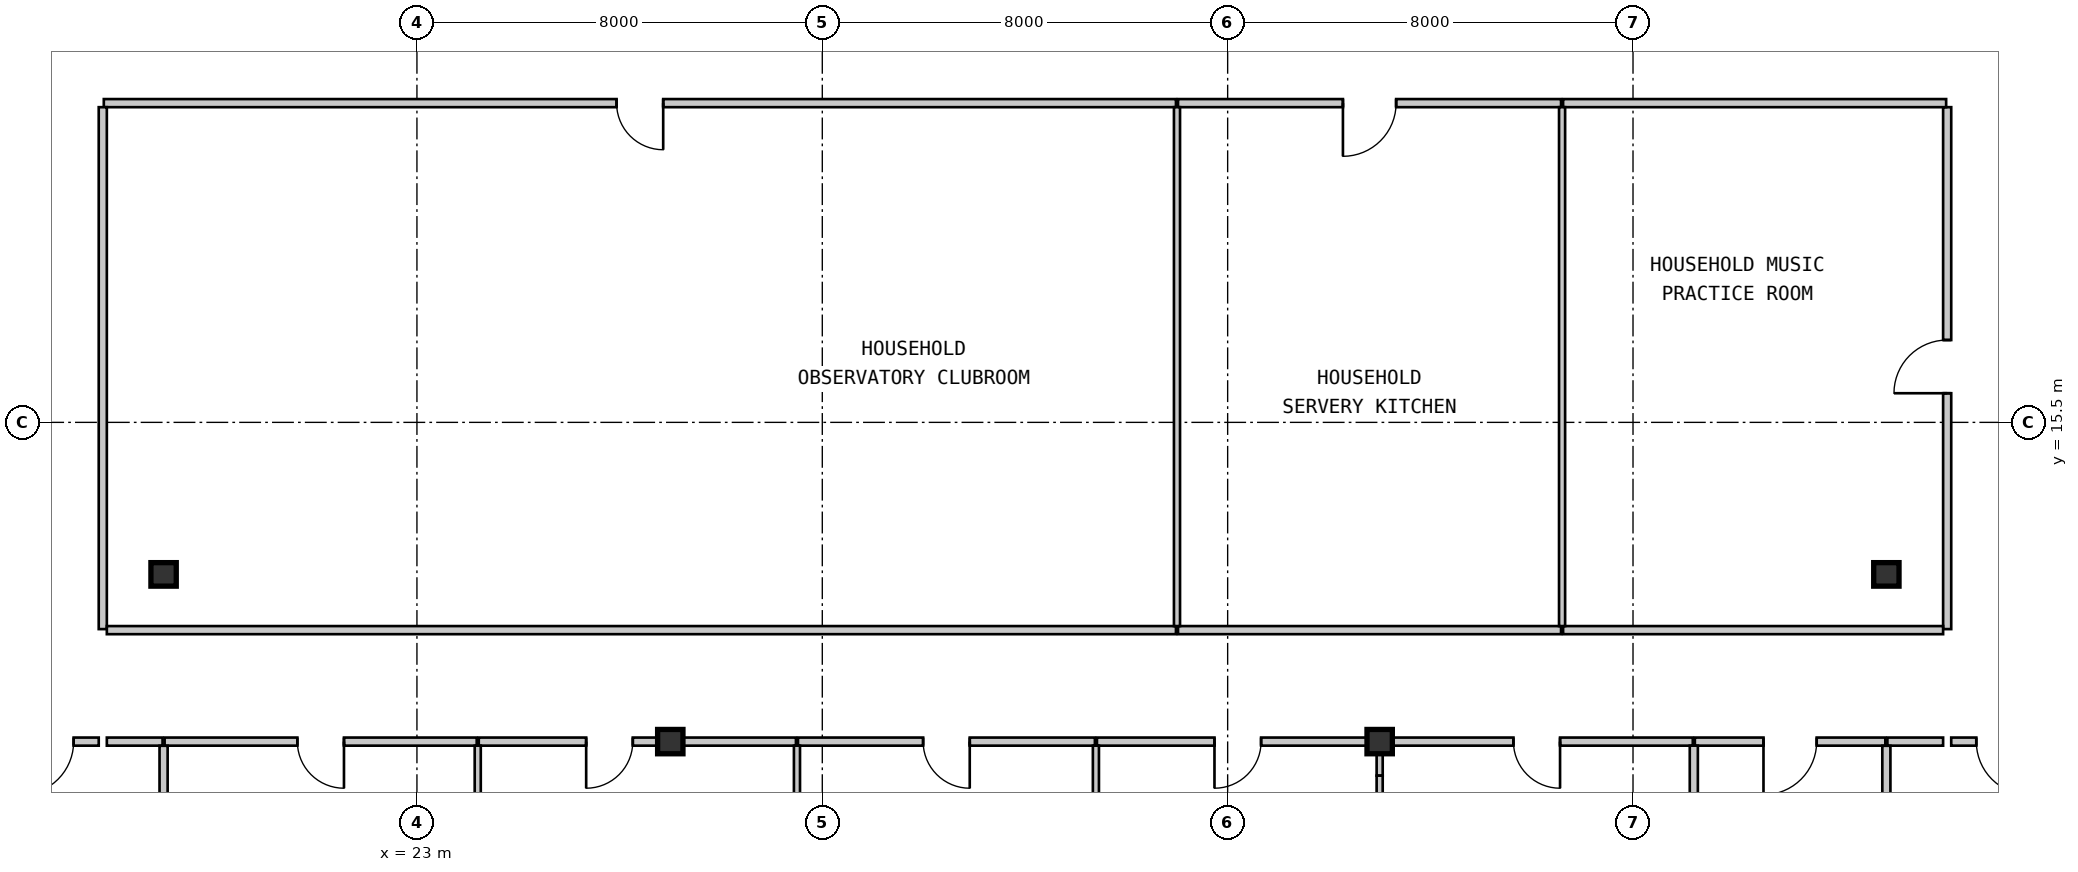
"""IFC4 building model, lengths in metres.
Left out: names, types, materials, properties, quantities, classifications, styles, units other than length and angle.
Written with IfcOpenShell. Run it as: python <this file> out.ifc"""

import sys

from ifc_helpers import new_model, si_unit, direction, frame, frame_2d, origin, origin_2d, place, context, subcontext, project, spatial, rectangle, i_section, extrude, source, transform, mapped, element, fill, save


model = new_model("IFC4")
c1 = context("Model", 3, precision=1e-05, world=origin(), true_north=direction((0.0, 1.0)))
c2 = subcontext(c1, "Body", "Model", "MODEL_VIEW")
j1 = project(units=[si_unit("LENGTHUNIT", "METRE"), si_unit("PLANEANGLEUNIT", "RADIAN")], contexts=[c1])
p1 = place(None, origin())
s1 = spatial("IfcSite", under=j1, at=p1, CompositionType="ELEMENT")
p2 = place(p1, origin())
s2 = spatial("IfcBuilding", under=s1, at=p2, CompositionType="ELEMENT")
p3 = place(p2, frame((0.0, 0.0, 51.45)))
s3 = spatial("IfcBuildingStorey", under=s2, at=p3, CompositionType="ELEMENT", Elevation=51.45)
m1 = source(origin(), c2, "Body", "SweptSolid", [
    extrude(i_section(OverallWidth=0.5, OverallDepth=0.48, WebThickness=0.028, FlangeThickness=0.044, at=origin_2d()), origin(), (0.0, 0.0, 1.0), 3.15),
])
for number, where, z_axis, x_axis in (
    (1, (28.0, 9.2, 0.0), (0.0, 0.0, 1.0), (1.0, 0.0, 0.0)),
    (2, (42.0, 9.2, 0.0), (0.0, 0.0, 1.0), (1.0, 0.0, 0.0)),
):
    element("IfcColumn", number, at=place(p3, frame(where, z_axis=z_axis, x_axis=x_axis)), inside=s3, PredefinedType="COLUMN", context=c2, shape_type="MappedRepresentation", body=[
        mapped(m1, transform((0.0, 0.0, 0.0), scale=1.0)),
    ])
m2 = source(origin(), c2, "Body", "SweptSolid", [
    extrude(i_section(OverallWidth=0.5, OverallDepth=0.464, WebThickness=0.022, FlangeThickness=0.034, at=origin_2d()), origin(), (0.0, 0.0, 1.0), 3.15),
])
for number, where, z_axis, x_axis in (
    (3, (18.0, 12.5, 0.0), (0.0, 0.0, 1.0), (1.0, 0.0, 0.0)),
    (4, (52.0, 12.5, 0.0), (0.0, 0.0, 1.0), (1.0, 0.0, 0.0)),
):
    element("IfcColumn", number, at=place(p3, frame(where, z_axis=z_axis, x_axis=x_axis)), inside=s3, PredefinedType="COLUMN", context=c2, shape_type="MappedRepresentation", body=[
        mapped(m2, transform((0.0, 0.0, 0.0), scale=1.0)),
    ])
m3 = source(origin(), c2, "Body", "SweptSolid", [
    extrude(rectangle(XDim=21.159, YDim=0.16, at=frame_2d((10.58, 0.0))), origin(), (0.0, 0.0, 1.0), 2.93),
])
p4 = place(p3, frame((37.98, 21.8, 0.0), z_axis=(0.0, 0.0, 1.0), x_axis=(-1.0, 0.0, 0.0)))
e5 = element("IfcWall", 5, at=p4, inside=s3, PredefinedType="PARTITIONING", context=c2, shape_type="MappedRepresentation", body=[
    mapped(m3, transform((0.0, 0.0, 0.0), scale=1.0)),
])
m4 = source(origin(), c2, "Body", "SweptSolid", [
    extrude(rectangle(XDim=0.92, YDim=2.1, at=frame_2d((0.46, 1.05))), frame((0.0, 0.09, 0.0), z_axis=(0.0, -1.0, 0.0), x_axis=(1.0, 0.0, 0.0)), (0.0, 0.0, 1.0), 0.18),
])
p5 = place(p4, frame((10.12, 0.0, 0.0)))
e6 = element("IfcOpeningElement", 6, at=p5, cuts=e5, PredefinedType="OPENING", context=c2, shape_type="MappedRepresentation", body=[
    mapped(m4, transform((0.0, 0.0, 0.0), scale=1.0)),
])
m5 = source(origin(), c2, "Body", "SweptSolid", [
    extrude(rectangle(XDim=10.3, YDim=0.16, at=frame_2d((5.15, 0.0))), origin(), (0.0, 0.0, 1.0), 2.93),
])
p6 = place(p3, frame((16.8, 21.72, 0.0), z_axis=(0.0, 0.0, 1.0), x_axis=(0.0, -1.0, 0.0)))
e7 = element("IfcWall", 7, at=p6, inside=s3, PredefinedType="PARTITIONING", context=c2, shape_type="MappedRepresentation", body=[
    mapped(m5, transform((0.0, 0.0, 0.0), scale=1.0)),
])
m6 = source(origin(), c2, "Body", "SweptSolid", [
    extrude(rectangle(XDim=7.56, YDim=0.16, at=frame_2d((3.78, 0.0))), origin(), (0.0, 0.0, 1.0), 2.93),
])
p7 = place(p3, frame((45.58, 21.8, 0.0), z_axis=(0.0, 0.0, 1.0), x_axis=(-1.0, 0.0, 0.0)))
e8 = element("IfcWall", 8, at=p7, inside=s3, PredefinedType="PARTITIONING", context=c2, shape_type="MappedRepresentation", body=[
    mapped(m6, transform((0.0, 0.0, 0.0), scale=1.0)),
])
m7 = source(origin(), c2, "Body", "SweptSolid", [
    extrude(rectangle(XDim=1.05, YDim=2.1, at=frame_2d((0.525, 1.05))), frame((0.0, 0.09, 0.0), z_axis=(0.0, -1.0, 0.0), x_axis=(1.0, 0.0, 0.0)), (0.0, 0.0, 1.0), 0.18),
])
p8 = place(p7, frame((3.255, 0.0, 0.0)))
e9 = element("IfcOpeningElement", 9, at=p8, cuts=e8, PredefinedType="OPENING", context=c2, shape_type="MappedRepresentation", body=[
    mapped(m7, transform((0.0, 0.0, 0.0), scale=1.0)),
])
p9 = place(p3, frame((53.2, 11.42, 0.0), z_axis=(0.0, 0.0, 1.0), x_axis=(0.0, 1.0, 0.0)))
e10 = element("IfcWall", 10, at=p9, inside=s3, PredefinedType="PARTITIONING", context=c2, shape_type="MappedRepresentation", body=[
    mapped(m5, transform((0.0, 0.0, 0.0), scale=1.0)),
])
p10 = place(p9, frame((4.655, 0.0, 0.0)))
e11 = element("IfcOpeningElement", 11, at=p10, cuts=e10, PredefinedType="OPENING", context=c2, shape_type="MappedRepresentation", body=[
    mapped(m7, transform((0.0, 0.0, 0.0), scale=1.0)),
])
p11 = place(p3, frame((53.18, 21.8, 0.0), z_axis=(0.0, 0.0, 1.0), x_axis=(-1.0, 0.0, 0.0)))
e12 = element("IfcWall", 12, at=p11, inside=s3, PredefinedType="PARTITIONING", context=c2, shape_type="MappedRepresentation", body=[
    mapped(m6, transform((0.0, 0.0, 0.0), scale=1.0)),
])
m8 = source(origin(), c2, "Body", "SweptSolid", [
    extrude(rectangle(XDim=2.04, YDim=0.16, at=frame_2d((1.02, 0.0))), origin(), (0.0, 0.0, 1.0), 2.93),
])
p12 = place(p3, frame((16.72, 9.2, 0.0), z_axis=(0.0, 0.0, 1.0), x_axis=(-1.0, 0.0, 0.0)))
e13 = element("IfcWall", 13, at=p12, inside=s3, PredefinedType="PARTITIONING", context=c2, shape_type="MappedRepresentation", body=[
    mapped(m8, transform((0.0, 0.0, 0.0), scale=1.0)),
])
p13 = place(p12, frame((0.495, 0.0, 0.0)))
e14 = element("IfcOpeningElement", 14, at=p13, cuts=e13, PredefinedType="OPENING", context=c2, shape_type="MappedRepresentation", body=[
    mapped(m7, transform((0.0, 0.0, 0.0), scale=1.0)),
])
p14 = place(p3, frame((55.32, 9.2, 0.0), z_axis=(0.0, 0.0, 1.0), x_axis=(-1.0, 0.0, 0.0)))
e15 = element("IfcWall", 15, at=p14, inside=s3, PredefinedType="PARTITIONING", context=c2, shape_type="MappedRepresentation", body=[
    mapped(m8, transform((0.0, 0.0, 0.0), scale=1.0)),
])
p15 = place(p14, frame((0.495, 0.0, 0.0)))
e16 = element("IfcOpeningElement", 16, at=p15, cuts=e15, PredefinedType="OPENING", context=c2, shape_type="MappedRepresentation", body=[
    mapped(m7, transform((0.0, 0.0, 0.0), scale=1.0)),
])
m9 = source(origin(), c2, "Body", "SweptSolid", [
    extrude(rectangle(XDim=21.1, YDim=0.16, at=frame_2d((10.55, 0.0))), origin(), (0.0, 0.0, 1.0), 2.93),
])
p16 = place(p3, frame((16.88, 11.4, 0.0), z_axis=(0.0, 0.0, 1.0), x_axis=(1.0, 0.0, 0.0)))
e17 = element("IfcWall", 17, at=p16, inside=s3, PredefinedType="PARTITIONING", context=c2, shape_type="MappedRepresentation", body=[
    mapped(m9, transform((0.0, 0.0, 0.0), scale=1.0)),
])
p17 = place(p3, frame((38.02, 11.4, 0.0), z_axis=(0.0, 0.0, 1.0), x_axis=(1.0, 0.0, 0.0)))
e18 = element("IfcWall", 18, at=p17, inside=s3, PredefinedType="PARTITIONING", context=c2, shape_type="MappedRepresentation", body=[
    mapped(m6, transform((0.0, 0.0, 0.0), scale=1.0)),
])
m10 = source(origin(), c2, "Body", "SweptSolid", [
    extrude(rectangle(XDim=7.5, YDim=0.16, at=frame_2d((3.75, 0.0))), origin(), (0.0, 0.0, 1.0), 2.93),
])
p18 = place(p3, frame((45.62, 11.4, 0.0), z_axis=(0.0, 0.0, 1.0), x_axis=(1.0, 0.0, 0.0)))
e19 = element("IfcWall", 19, at=p18, inside=s3, PredefinedType="PARTITIONING", context=c2, shape_type="MappedRepresentation", body=[
    mapped(m10, transform((0.0, 0.0, 0.0), scale=1.0)),
])
m11 = source(origin(), c2, "Body", "SweptSolid", [
    extrude(rectangle(XDim=1.1, YDim=0.16, at=frame_2d((0.55, 0.0))), origin(), (0.0, 0.0, 1.0), 2.93),
])
p19 = place(p3, frame((17.98, 9.2, 0.0), z_axis=(0.0, 0.0, 1.0), x_axis=(-1.0, 0.0, 0.0)))
e20 = element("IfcWall", 20, at=p19, inside=s3, PredefinedType="PARTITIONING", context=c2, shape_type="MappedRepresentation", body=[
    mapped(m11, transform((0.0, 0.0, 0.0), scale=1.0)),
])
m12 = source(origin(), c2, "Body", "SweptSolid", [
    extrude(rectangle(XDim=6.159, YDim=0.16, at=frame_2d((3.08, 0.0))), origin(), (0.0, 0.0, 1.0), 2.93),
])
p20 = place(p3, frame((24.18, 9.2, 0.0), z_axis=(0.0, 0.0, 1.0), x_axis=(-1.0, 0.0, 0.0)))
e21 = element("IfcWall", 21, at=p20, inside=s3, PredefinedType="PARTITIONING", context=c2, shape_type="MappedRepresentation", body=[
    mapped(m12, transform((0.0, 0.0, 0.0), scale=1.0)),
])
p21 = place(p20, frame((2.62, 0.0, 0.0)))
e22 = element("IfcOpeningElement", 22, at=p21, cuts=e21, PredefinedType="OPENING", context=c2, shape_type="MappedRepresentation", body=[
    mapped(m4, transform((0.0, 0.0, 0.0), scale=1.0)),
])
m13 = source(origin(), c2, "Body", "SweptSolid", [
    extrude(rectangle(XDim=2.48, YDim=0.16, at=frame_2d((1.24, 0.0))), origin(), (0.0, 0.0, 1.0), 2.328),
])
p22 = place(p3, frame((30.48, 9.2, 0.0), z_axis=(0.0, 0.0, 1.0), x_axis=(-1.0, 0.0, 0.0)))
e23 = element("IfcWall", 23, at=p22, inside=s3, PredefinedType="PARTITIONING", context=c2, shape_type="MappedRepresentation", body=[
    mapped(m13, transform((0.0, 0.0, 0.0), scale=1.0)),
])
m14 = source(origin(), c2, "Body", "SweptSolid", [
    extrude(rectangle(XDim=3.78, YDim=0.16, at=frame_2d((1.89, 0.0))), origin(), (0.0, 0.0, 1.0), 2.93),
])
p23 = place(p3, frame((28.0, 9.2, 0.0), z_axis=(0.0, 0.0, 1.0), x_axis=(-1.0, 0.0, 0.0)))
e24 = element("IfcWall", 24, at=p23, inside=s3, PredefinedType="PARTITIONING", context=c2, shape_type="MappedRepresentation", body=[
    mapped(m14, transform((0.0, 0.0, 0.0), scale=1.0)),
])
p24 = place(p23, frame((0.74, 0.0, 0.0)))
e25 = element("IfcOpeningElement", 25, at=p24, cuts=e24, PredefinedType="OPENING", context=c2, shape_type="MappedRepresentation", body=[
    mapped(m4, transform((0.0, 0.0, 0.0), scale=1.0)),
])
m15 = source(origin(), c2, "Body", "SweptSolid", [
    extrude(rectangle(XDim=5.86, YDim=0.16, at=frame_2d((2.93, 0.0))), origin(), (0.0, 0.0, 1.0), 2.328),
])
p25 = place(p3, frame((36.38, 9.2, 0.0), z_axis=(0.0, 0.0, 1.0), x_axis=(-1.0, 0.0, 0.0)))
e26 = element("IfcWall", 26, at=p25, inside=s3, PredefinedType="PARTITIONING", context=c2, shape_type="MappedRepresentation", body=[
    mapped(m15, transform((0.0, 0.0, 0.0), scale=1.0)),
])
p26 = place(p25, frame((2.47, 0.0, 0.0)))
e27 = element("IfcOpeningElement", 27, at=p26, cuts=e26, PredefinedType="OPENING", context=c2, shape_type="MappedRepresentation", body=[
    mapped(m4, transform((0.0, 0.0, 0.0), scale=1.0)),
])
m16 = source(origin(), c2, "Body", "SweptSolid", [
    extrude(rectangle(XDim=5.56, YDim=0.16, at=frame_2d((2.78, 0.0))), origin(), (0.0, 0.0, 1.0), 2.328),
])
p27 = place(p3, frame((41.98, 9.2, 0.0), z_axis=(0.0, 0.0, 1.0), x_axis=(-1.0, 0.0, 0.0)))
e28 = element("IfcWall", 28, at=p27, inside=s3, PredefinedType="PARTITIONING", context=c2, shape_type="MappedRepresentation", body=[
    mapped(m16, transform((0.0, 0.0, 0.0), scale=1.0)),
])
p28 = place(p27, frame((2.32, 0.0, 0.0)))
e29 = element("IfcOpeningElement", 29, at=p28, cuts=e28, PredefinedType="OPENING", context=c2, shape_type="MappedRepresentation", body=[
    mapped(m4, transform((0.0, 0.0, 0.0), scale=1.0)),
])
p29 = place(p3, frame((48.18, 9.2, 0.0), z_axis=(0.0, 0.0, 1.0), x_axis=(-1.0, 0.0, 0.0)))
e30 = element("IfcWall", 30, at=p29, inside=s3, PredefinedType="PARTITIONING", context=c2, shape_type="MappedRepresentation", body=[
    mapped(m12, transform((0.0, 0.0, 0.0), scale=1.0)),
])
p30 = place(p29, frame((2.62, 0.0, 0.0)))
e31 = element("IfcOpeningElement", 31, at=p30, cuts=e30, PredefinedType="OPENING", context=c2, shape_type="MappedRepresentation", body=[
    mapped(m4, transform((0.0, 0.0, 0.0), scale=1.0)),
])
m17 = source(origin(), c2, "Body", "SweptSolid", [
    extrude(rectangle(XDim=3.76, YDim=0.16, at=frame_2d((1.88, 0.0))), origin(), (0.0, 0.0, 1.0), 2.93),
])
p31 = place(p3, frame((51.98, 9.2, 0.0), z_axis=(0.0, 0.0, 1.0), x_axis=(-1.0, 0.0, 0.0)))
e32 = element("IfcWall", 32, at=p31, inside=s3, PredefinedType="PARTITIONING", context=c2, shape_type="MappedRepresentation", body=[
    mapped(m17, transform((0.0, 0.0, 0.0), scale=1.0)),
])
p32 = place(p31, frame((1.355, 0.0, 0.0)))
e33 = element("IfcOpeningElement", 33, at=p32, cuts=e32, PredefinedType="OPENING", context=c2, shape_type="MappedRepresentation", body=[
    mapped(m7, transform((0.0, 0.0, 0.0), scale=1.0)),
])
p33 = place(p3, frame((53.12, 9.2, 0.0), z_axis=(0.0, 0.0, 1.0), x_axis=(-1.0, 0.0, 0.0)))
e34 = element("IfcWall", 34, at=p33, inside=s3, PredefinedType="PARTITIONING", context=c2, shape_type="MappedRepresentation", body=[
    mapped(m11, transform((0.0, 0.0, 0.0), scale=1.0)),
])
m18 = source(origin(), c2, "Body", "SweptSolid", [
    extrude(rectangle(XDim=10.24, YDim=0.12, at=frame_2d((5.12, 0.0))), origin(), (0.0, 0.0, 1.0), 2.93),
])
for number, where, z_axis, x_axis in (
    (35, (38.0, 21.72, 0.0), (0.0, 0.0, 1.0), (0.0, -1.0, 0.0)),
    (36, (45.6, 21.72, 0.0), (0.0, 0.0, 1.0), (0.0, -1.0, 0.0)),
):
    element("IfcWall", number, at=place(p3, frame(where, z_axis=z_axis, x_axis=x_axis)), inside=s3, PredefinedType="PARTITIONING", context=c2, shape_type="MappedRepresentation", body=[
        mapped(m18, transform((0.0, 0.0, 0.0), scale=1.0)),
    ])
m19 = source(origin(), c2, "Body", "SweptSolid", [
    extrude(rectangle(XDim=7.386, YDim=0.16, at=frame_2d((3.693, 0.0))), origin(), (0.0, 0.0, 1.0), 2.93),
])
p34 = place(p3, frame((18.0, 9.118, 0.0), z_axis=(0.0, 0.0, 1.0), x_axis=(0.0, -1.0, 0.0)))
e37 = element("IfcWall", 37, at=p34, inside=s3, PredefinedType="PARTITIONING", context=c2, shape_type="MappedRepresentation", body=[
    mapped(m19, transform((0.0, 0.0, 0.0), scale=1.0)),
])
m20 = source(origin(), c2, "Body", "SweptSolid", [
    extrude(rectangle(XDim=7.39, YDim=0.12, at=frame_2d((3.695, 0.0))), origin(), (0.0, 0.0, 1.0), 2.93),
])
for number, where, z_axis, x_axis in (
    (38, (24.2, 9.12, 0.0), (0.0, 0.0, 1.0), (0.0, -1.0, 0.0)),
    (39, (30.5, 9.12, 0.0), (0.0, 0.0, 1.0), (0.0, -1.0, 0.0)),
    (40, (36.4, 9.12, 0.0), (0.0, 0.0, 1.0), (0.0, -1.0, 0.0)),
):
    element("IfcWall", number, at=place(p3, frame(where, z_axis=z_axis, x_axis=x_axis)), inside=s3, PredefinedType="PARTITIONING", context=c2, shape_type="MappedRepresentation", body=[
        mapped(m20, transform((0.0, 0.0, 0.0), scale=1.0)),
    ])
m21 = source(origin(), c2, "Body", "SweptSolid", [
    extrude(rectangle(XDim=0.592, YDim=0.12, at=frame_2d((0.296, 0.0))), origin(), (0.0, 0.0, 1.0), 2.397),
])
p35 = place(p3, frame((42.0, 9.12, 0.0), z_axis=(0.0, 0.0, 1.0), x_axis=(0.0, -1.0, 0.0)))
e41 = element("IfcWall", 41, at=p35, inside=s3, PredefinedType="PARTITIONING", context=c2, shape_type="MappedRepresentation", body=[
    mapped(m21, transform((0.0, 0.0, 0.0), scale=1.0)),
])
m22 = source(origin(), c2, "Body", "SweptSolid", [
    extrude(rectangle(XDim=6.798, YDim=0.12, at=frame_2d((3.399, 0.0))), origin(), (0.0, 0.0, 1.0), 2.93),
])
p36 = place(p3, frame((42.0, 8.528, 0.0), z_axis=(0.0, 0.0, 1.0), x_axis=(0.0, -1.0, 0.0)))
e42 = element("IfcWall", 42, at=p36, inside=s3, PredefinedType="PARTITIONING", context=c2, shape_type="MappedRepresentation", body=[
    mapped(m22, transform((0.0, 0.0, 0.0), scale=1.0)),
])
m23 = source(origin(), c2, "Body", "SweptSolid", [
    extrude(rectangle(XDim=2.45, YDim=0.16, at=frame_2d((1.225, 0.0))), origin(), (0.0, 0.0, 1.0), 2.93),
])
p37 = place(p3, frame((48.2, 9.12, 0.0), z_axis=(0.0, 0.0, 1.0), x_axis=(0.0, -1.0, 0.0)))
e43 = element("IfcWall", 43, at=p37, inside=s3, PredefinedType="PARTITIONING", context=c2, shape_type="MappedRepresentation", body=[
    mapped(m23, transform((0.0, 0.0, 0.0), scale=1.0)),
])
m24 = source(origin(), c2, "Body", "SweptSolid", [
    extrude(rectangle(XDim=2.448, YDim=0.16, at=frame_2d((1.224, 0.0))), origin(), (0.0, 0.0, 1.0), 2.93),
])
p38 = place(p3, frame((52.0, 9.118, 0.0), z_axis=(0.0, 0.0, 1.0), x_axis=(0.0, -1.0, 0.0)))
e44 = element("IfcWall", 44, at=p38, inside=s3, PredefinedType="PARTITIONING", context=c2, shape_type="MappedRepresentation", body=[
    mapped(m24, transform((0.0, 0.0, 0.0), scale=1.0)),
])
m25 = source(origin(), c2, "Body", "SweptSolid", [
    extrude(rectangle(XDim=0.92, YDim=2.1, at=frame_2d((0.46, 1.05))), frame((0.0, 0.025, 0.0), z_axis=(0.0, -1.0, 0.0), x_axis=(1.0, 0.0, 0.0)), (0.0, 0.0, 1.0), 0.05),
])
p39 = place(p5, origin())
e45 = element("IfcDoor", 45, at=p39, inside=s3, OperationType="SINGLE_SWING_LEFT", PredefinedType="DOOR", context=c2, shape_type="MappedRepresentation", body=[
    mapped(m25, transform((0.0, 0.0, 0.0), scale=1.0)),
])
fill(e6, e45)
m26 = source(origin(), c2, "Body", "SweptSolid", [
    extrude(rectangle(XDim=1.05, YDim=2.1, at=frame_2d((0.525, 1.05))), frame((0.0, 0.025, 0.0), z_axis=(0.0, -1.0, 0.0), x_axis=(1.0, 0.0, 0.0)), (0.0, 0.0, 1.0), 0.05),
])
p40 = place(p8, origin())
e46 = element("IfcDoor", 46, at=p40, inside=s3, OperationType="SINGLE_SWING_RIGHT", PredefinedType="DOOR", context=c2, shape_type="MappedRepresentation", body=[
    mapped(m26, transform((0.0, 0.0, 0.0), scale=1.0)),
])
fill(e9, e46)
p41 = place(p10, origin())
e47 = element("IfcDoor", 47, at=p41, inside=s3, OperationType="SINGLE_SWING_LEFT", PredefinedType="DOOR", context=c2, shape_type="MappedRepresentation", body=[
    mapped(m26, transform((0.0, 0.0, 0.0), scale=1.0)),
])
fill(e11, e47)
p42 = place(p13, origin())
e48 = element("IfcDoor", 48, at=p42, inside=s3, OperationType="SINGLE_SWING_RIGHT", PredefinedType="DOOR", context=c2, shape_type="MappedRepresentation", body=[
    mapped(m26, transform((0.0, 0.0, 0.0), scale=1.0)),
])
fill(e14, e48)
p43 = place(p15, origin())
e49 = element("IfcDoor", 49, at=p43, inside=s3, OperationType="SINGLE_SWING_LEFT", PredefinedType="DOOR", context=c2, shape_type="MappedRepresentation", body=[
    mapped(m26, transform((0.0, 0.0, 0.0), scale=1.0)),
])
fill(e16, e49)
p44 = place(p21, origin())
e50 = element("IfcDoor", 50, at=p44, inside=s3, OperationType="SINGLE_SWING_LEFT", PredefinedType="DOOR", context=c2, shape_type="MappedRepresentation", body=[
    mapped(m25, transform((0.0, 0.0, 0.0), scale=1.0)),
])
fill(e22, e50)
p45 = place(p24, origin())
e51 = element("IfcDoor", 51, at=p45, inside=s3, OperationType="SINGLE_SWING_RIGHT", PredefinedType="DOOR", context=c2, shape_type="MappedRepresentation", body=[
    mapped(m25, transform((0.0, 0.0, 0.0), scale=1.0)),
])
fill(e25, e51)
p46 = place(p26, origin())
e52 = element("IfcDoor", 52, at=p46, inside=s3, OperationType="SINGLE_SWING_LEFT", PredefinedType="DOOR", context=c2, shape_type="MappedRepresentation", body=[
    mapped(m25, transform((0.0, 0.0, 0.0), scale=1.0)),
])
fill(e27, e52)
p47 = place(p28, origin())
e53 = element("IfcDoor", 53, at=p47, inside=s3, OperationType="SINGLE_SWING_RIGHT", PredefinedType="DOOR", context=c2, shape_type="MappedRepresentation", body=[
    mapped(m25, transform((0.0, 0.0, 0.0), scale=1.0)),
])
fill(e29, e53)
p48 = place(p30, origin())
e54 = element("IfcDoor", 54, at=p48, inside=s3, OperationType="SINGLE_SWING_LEFT", PredefinedType="DOOR", context=c2, shape_type="MappedRepresentation", body=[
    mapped(m25, transform((0.0, 0.0, 0.0), scale=1.0)),
])
fill(e31, e54)
p49 = place(p32, origin())
e55 = element("IfcDoor", 55, at=p49, inside=s3, OperationType="SINGLE_SWING_RIGHT", PredefinedType="DOOR", context=c2, shape_type="MappedRepresentation", body=[
    mapped(m26, transform((0.0, 0.0, 0.0), scale=1.0)),
])
fill(e33, e55)
save(model, sys.argv[1])
